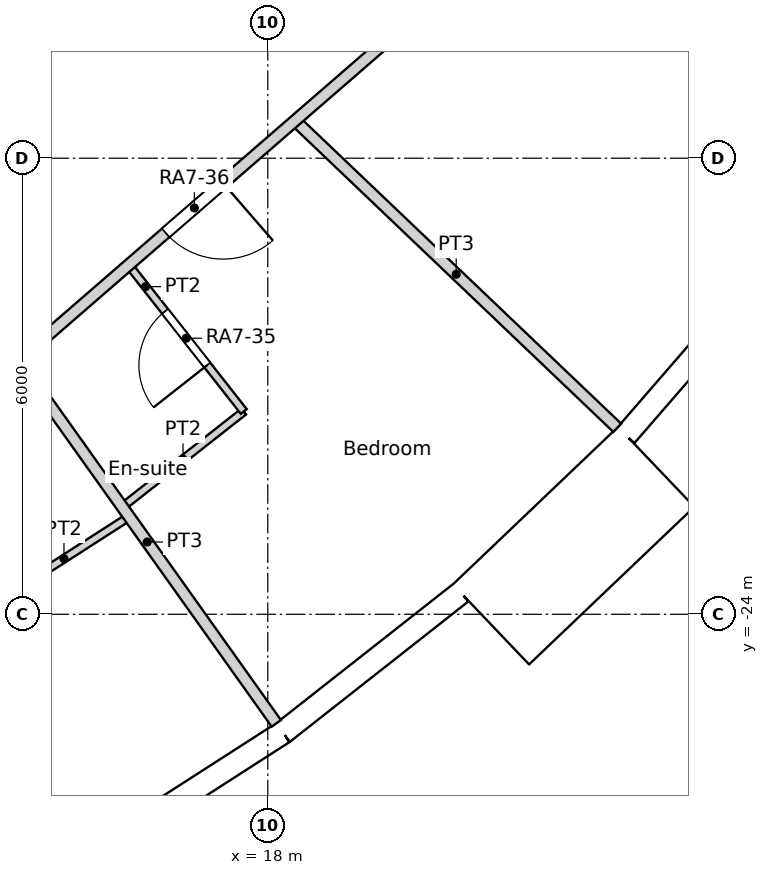
"""IFC4 building model, lengths in metres.
Left out: names, types, materials, properties, quantities, classifications, styles, units other than length and angle.
Written with IfcOpenShell. Run it as: python <this file> out.ifc"""

import sys

from ifc_helpers import new_model, si_unit, direction, frame, frame_2d, origin, origin_2d, place, context, subcontext, project, spatial, rectangle, circle, extrude, element, fill, save


model = new_model("IFC4")
c1 = context("Model", 3, precision=1e-05, world=origin(), true_north=direction((0.0, 1.0)))
c2 = subcontext(c1, "Body", "Model", "MODEL_VIEW")
j1 = project(units=[si_unit("LENGTHUNIT", "METRE"), si_unit("PLANEANGLEUNIT", "RADIAN")], contexts=[c1])
p1 = place(None, origin())
s1 = spatial("IfcSite", under=j1, at=p1, CompositionType="ELEMENT")
p2 = place(p1, origin())
s2 = spatial("IfcBuilding", under=s1, at=p2, CompositionType="ELEMENT")
p3 = place(p2, frame((0.0, 0.0, 93.0)))
s3 = spatial("IfcBuildingStorey", under=s2, at=p3, CompositionType="ELEMENT", Elevation=93.0)
for number, where, z_axis, x_axis in (
    (1, (17.561, -24.661, 0.0), (0.0, 0.0, 1.0), (1.0, 0.0, 0.0)),
    (2, (21.911, -20.892, 0.0), (0.0, 0.0, 1.0), (1.0, 0.0, 0.0)),
):
    element("IfcColumn", number, at=place(p3, frame(where, z_axis=z_axis, x_axis=x_axis)), inside=s3, PredefinedType="COLUMN", context=c2, shape_type="SweptSolid", body=[
        extrude(circle(Radius=0.6, at=origin_2d()), origin(), (0.0, 0.0, 1.0), 3.6),
    ])
p4 = place(p3, frame((14.659, -19.69, 0.0), z_axis=(0.0, 0.0, 1.0), x_axis=(1.0, 0.0, 0.0)))
e3 = element("IfcColumn", 3, at=p4, inside=s3, PredefinedType="COLUMN", context=c2, shape_type="SweptSolid", body=[
    extrude(circle(Radius=0.65, at=origin_2d()), origin(), (0.0, 0.0, 1.0), 3.6),
])
p5 = place(p3, frame((15.692, -27.168, 0.0), z_axis=(0.0, 0.0, 1.0), x_axis=(0.841260995538, 0.54062920508, 0.0)))
e4 = element("IfcWall", 4, at=p5, inside=s3, PredefinedType="SOLIDWALL", context=c2, shape_type="SweptSolid", body=[
    extrude(rectangle(XDim=2.979, YDim=0.3, at=frame_2d((1.49, 0.0))), origin(), (0.0, 0.0, 1.0), 3.15),
])
p6 = place(p5, frame((1.49, 0.0, 1.55)))
e5 = element("IfcOpeningElement", 5, at=p6, cuts=e4, PredefinedType="OPENING", context=c2, shape_type="SweptSolid", body=[
    extrude(circle(Radius=0.9, at=origin_2d()), frame((0.0, 0.16, 0.0), z_axis=(0.0, -1.0, 0.0), x_axis=(1.0, 0.0, 0.0)), (0.0, 0.0, 1.0), 0.32),
])
p7 = place(p3, frame((18.199, -25.557, 0.0), z_axis=(0.0, 0.0, 1.0), x_axis=(0.786053834673, 0.618158045322, 0.0)))
e6 = element("IfcWall", 6, at=p7, inside=s3, PredefinedType="SOLIDWALL", context=c2, shape_type="SweptSolid", body=[
    extrude(rectangle(XDim=2.979, YDim=0.3, at=frame_2d((1.49, 0.0))), origin(), (0.0, 0.0, 1.0), 3.15),
])
p8 = place(p7, frame((1.49, 0.0, 1.55)))
e7 = element("IfcOpeningElement", 7, at=p8, cuts=e6, PredefinedType="OPENING", context=c2, shape_type="SweptSolid", body=[
    extrude(circle(Radius=0.9, at=origin_2d()), frame((0.0, 0.16, 0.0), z_axis=(0.0, -1.0, 0.0), x_axis=(1.0, 0.0, 0.0)), (0.0, 0.0, 1.0), 0.32),
])
p9 = place(p3, frame((20.938, -24.132, -0.45), z_axis=(0.0, 0.0, 1.0), x_axis=(0.723712023899, 0.690102098579, 0.0)))
e8 = element("IfcWall", 8, at=p9, inside=s3, PredefinedType="ELEMENTEDWALL", context=c2, shape_type="SweptSolid", body=[
    extrude(rectangle(XDim=3.0, YDim=1.45, at=frame_2d((1.5, 0.0))), origin(), (0.0, 0.0, 1.0), 3.6),
])
p10 = place(p9, frame((1.5, 0.0, 2.0)))
e9 = element("IfcOpeningElement", 9, at=p10, cuts=e8, PredefinedType="OPENING", context=c2, shape_type="SweptSolid", body=[
    extrude(circle(Radius=0.9, at=origin_2d()), frame((0.0, 0.735, 0.0), z_axis=(0.0, -1.0, 0.0), x_axis=(1.0, 0.0, 0.0)), (0.0, 0.0, 1.0), 1.47),
])
p11 = place(p3, frame((22.711, -21.646, 0.0), z_axis=(0.0, 0.0, 1.0), x_axis=(0.654830712471, 0.755775587066, 0.0)))
e10 = element("IfcWall", 10, at=p11, inside=s3, PredefinedType="SOLIDWALL", context=c2, shape_type="SweptSolid", body=[
    extrude(rectangle(XDim=2.98, YDim=0.3, at=frame_2d((1.49, 0.0))), origin(), (0.0, 0.0, 1.0), 3.15),
])
p12 = place(p11, frame((1.49, 0.0, 1.55)))
e11 = element("IfcOpeningElement", 11, at=p12, cuts=e10, PredefinedType="OPENING", context=c2, shape_type="SweptSolid", body=[
    extrude(circle(Radius=0.9, at=origin_2d()), frame((0.0, 0.16, 0.0), z_axis=(0.0, -1.0, 0.0), x_axis=(1.0, 0.0, 0.0)), (0.0, 0.0, 1.0), 0.32),
])
p13 = place(p3, frame((13.247, -21.939, 0.0), z_axis=(0.0, 0.0, 1.0), x_axis=(0.755420750547, 0.655240024451, 0.0)))
e12 = element("IfcWall", 12, at=p13, inside=s3, PredefinedType="PARTITIONING", context=c2, shape_type="SweptSolid", body=[
    extrude(rectangle(XDim=11.771, YDim=0.15, at=frame_2d((5.885, 0.0))), origin(), (0.0, 0.0, 1.0), 3.15),
])
p14 = place(p13, frame((4.513, 0.0, 0.0)))
e13 = element("IfcOpeningElement", 13, at=p14, cuts=e12, PredefinedType="OPENING", context=c2, shape_type="SweptSolid", body=[
    extrude(rectangle(XDim=1.0, YDim=2.1, at=frame_2d((0.5, 1.05))), frame((0.0, 0.075, 0.0), z_axis=(0.0, -1.0, 0.0), x_axis=(1.0, 0.0, 0.0)), (0.0, 0.0, 1.0), 0.15),
])
p15 = place(p3, frame((14.46, -23.821, 0.0), z_axis=(0.0, 0.0, 1.0), x_axis=(0.841135728185, 0.540824081168, 0.0)))
e14 = element("IfcWall", 14, at=p15, inside=s3, PredefinedType="PARTITIONING", context=c2, shape_type="SweptSolid", body=[
    extrude(rectangle(XDim=2.041, YDim=0.1, at=frame_2d((1.021, 0.0))), origin(), (0.0, 0.0, 1.0), 3.15),
])
p16 = place(p3, frame((14.715, -20.664, 0.0), z_axis=(0.0, 0.0, 1.0), x_axis=(0.57995989616, -0.814645026282, 0.0)))
e15 = element("IfcWall", 15, at=p16, inside=s3, PredefinedType="PARTITIONING", context=c2, shape_type="SweptSolid", body=[
    extrude(rectangle(XDim=5.857, YDim=0.15, at=frame_2d((2.928, 0.0))), origin(), (0.0, 0.0, 1.0), 3.15),
])
p17 = place(p3, frame((16.086, -22.589, 0.0), z_axis=(0.0, 0.0, 1.0), x_axis=(0.785984904201, 0.618245687707, 0.0)))
e16 = element("IfcWall", 16, at=p17, inside=s3, PredefinedType="PARTITIONING", context=c2, shape_type="SweptSolid", body=[
    extrude(rectangle(XDim=2.033, YDim=0.1, at=frame_2d((1.017, 0.0))), origin(), (0.0, 0.0, 1.0), 3.15),
])
p18 = place(p3, frame((16.168, -19.404, 0.0), z_axis=(0.0, 0.0, 1.0), x_axis=(0.618142414415, -0.786066126672, 0.0)))
e17 = element("IfcWall", 17, at=p18, inside=s3, PredefinedType="PARTITIONING", context=c2, shape_type="SweptSolid", body=[
    extrude(rectangle(XDim=2.453, YDim=0.1, at=frame_2d((1.226, 0.0))), origin(), (0.0, 0.0, 1.0), 3.15),
])
p19 = place(p18, frame((0.777, 0.0, 0.0)))
e18 = element("IfcOpeningElement", 18, at=p19, cuts=e17, PredefinedType="OPENING", context=c2, shape_type="SweptSolid", body=[
    extrude(rectangle(XDim=0.9, YDim=2.04, at=frame_2d((0.45, 1.02))), frame((0.0, 0.05, 0.0), z_axis=(0.0, -1.0, 0.0), x_axis=(1.0, 0.0, 0.0)), (0.0, 0.0, 1.0), 0.1),
])
p20 = place(p3, frame((18.359, -17.506, 0.0), z_axis=(0.0, 0.0, 1.0), x_axis=(0.723808715798, -0.690000683286, 0.0)))
e19 = element("IfcWall", 19, at=p20, inside=s3, PredefinedType="PARTITIONING", context=c2, shape_type="SweptSolid", body=[
    extrude(rectangle(XDim=5.856, YDim=0.15, at=frame_2d((2.928, 0.0))), origin(), (0.0, 0.0, 1.0), 3.15),
])
p21 = place(p6, origin())
e20 = element("IfcWindow", 20, at=p21, inside=s3, PartitioningType="SINGLE_PANEL", PredefinedType="WINDOW", context=c2, shape_type="SweptSolid", body=[
    extrude(circle(Radius=0.9, at=origin_2d()), frame((0.0, 0.12, 0.0), z_axis=(0.0, -1.0, 0.0), x_axis=(1.0, 0.0, 0.0)), (0.0, 0.0, 1.0), 0.1),
])
fill(e5, e20)
p22 = place(p8, origin())
e21 = element("IfcWindow", 21, at=p22, inside=s3, PartitioningType="SINGLE_PANEL", PredefinedType="WINDOW", context=c2, shape_type="SweptSolid", body=[
    extrude(circle(Radius=0.9, at=origin_2d()), frame((0.0, 0.12, 0.0), z_axis=(0.0, -1.0, 0.0), x_axis=(1.0, 0.0, 0.0)), (0.0, 0.0, 1.0), 0.1),
])
fill(e7, e21)
p23 = place(p10, origin())
e22 = element("IfcWindow", 22, at=p23, inside=s3, PartitioningType="SINGLE_PANEL", PredefinedType="WINDOW", context=c2, shape_type="SweptSolid", body=[
    extrude(circle(Radius=0.9, at=origin_2d()), frame((0.0, 0.695, 0.0), z_axis=(0.0, -1.0, 0.0), x_axis=(1.0, 0.0, 0.0)), (0.0, 0.0, 1.0), 0.1),
])
fill(e9, e22)
p24 = place(p12, origin())
e23 = element("IfcWindow", 23, at=p24, inside=s3, PartitioningType="SINGLE_PANEL", PredefinedType="WINDOW", context=c2, shape_type="SweptSolid", body=[
    extrude(circle(Radius=0.9, at=origin_2d()), frame((0.0, 0.12, 0.0), z_axis=(0.0, -1.0, 0.0), x_axis=(1.0, 0.0, 0.0)), (0.0, 0.0, 1.0), 0.1),
])
fill(e11, e23)
p25 = place(p19, origin())
e24 = element("IfcDoor", 24, at=p25, inside=s3, OperationType="SINGLE_SWING_LEFT", PredefinedType="DOOR", context=c2, shape_type="SweptSolid", body=[
    extrude(rectangle(XDim=0.9, YDim=2.04, at=frame_2d((0.45, 1.02))), frame((0.0, 0.025, 0.0), z_axis=(0.0, -1.0, 0.0), x_axis=(1.0, 0.0, 0.0)), (0.0, 0.0, 1.0), 0.05),
])
fill(e18, e24)
p26 = place(p14, origin())
e25 = element("IfcDoor", 25, at=p26, inside=s3, OperationType="SINGLE_SWING_LEFT", PredefinedType="DOOR", context=c2, shape_type="SweptSolid", body=[
    extrude(rectangle(XDim=1.0, YDim=2.1, at=frame_2d((0.5, 1.05))), frame((0.0, 0.025, 0.0), z_axis=(0.0, -1.0, 0.0), x_axis=(1.0, 0.0, 0.0)), (0.0, 0.0, 1.0), 0.05),
])
fill(e13, e25)
save(model, sys.argv[1])
